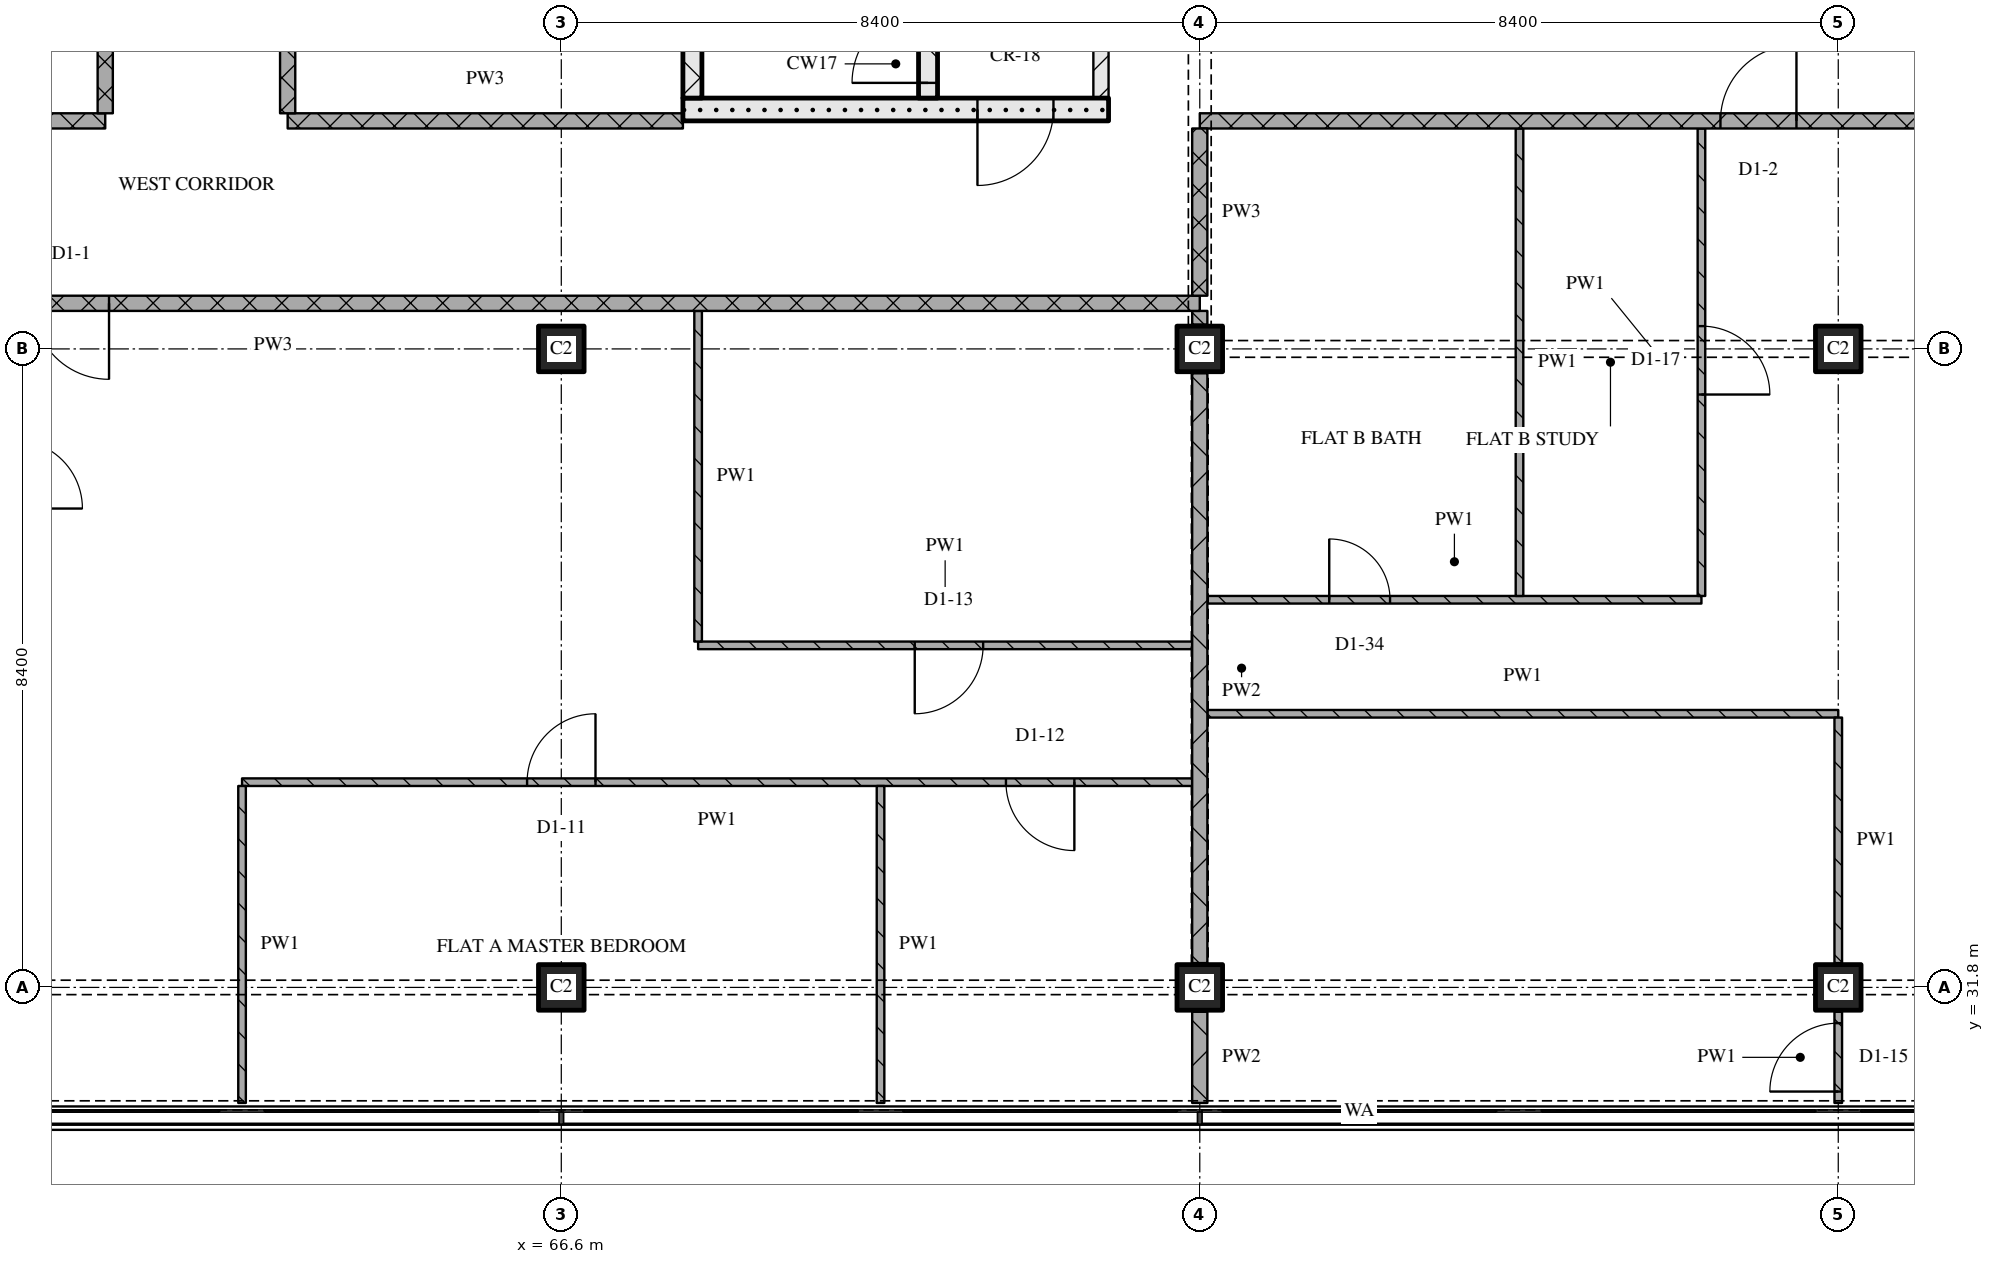
"""IFC4 building model, lengths in metres.
Left out: names, types, materials, properties, quantities, classifications, styles, units other than length and angle.
Written with IfcOpenShell. Run it as: python <this file> out.ifc"""

import sys

from ifc_helpers import new_model, si_unit, direction, frame, frame_2d, origin, origin_2d, place, context, subcontext, project, spatial, rectangle, extrude, element, fill, save


model = new_model("IFC4")
c1 = context("Model", 3, precision=1e-05, world=origin(), true_north=direction((0.0, 1.0)))
c2 = subcontext(c1, "Body", "Model", "MODEL_VIEW")
j1 = project(units=[si_unit("LENGTHUNIT", "METRE"), si_unit("PLANEANGLEUNIT", "RADIAN")], contexts=[c1])
p1 = place(None, origin())
s1 = spatial("IfcSite", under=j1, at=p1, CompositionType="ELEMENT")
p2 = place(p1, origin())
s2 = spatial("IfcBuilding", under=s1, at=p2, CompositionType="ELEMENT")
p3 = place(p2, frame((0.0, 0.0, 209.1)))
s3 = spatial("IfcBuildingStorey", under=s2, at=p3, CompositionType="ELEMENT", Elevation=209.1)
for number, where, z_axis, x_axis in (
    (1, (66.6, 31.8, 0.0), (0.0, 0.0, 1.0), (1.0, 0.0, 0.0)),
    (2, (66.6, 40.2, 0.0), (0.0, 0.0, 1.0), (1.0, 0.0, 0.0)),
    (3, (75.0, 31.8, 0.0), (0.0, 0.0, 1.0), (1.0, 0.0, 0.0)),
    (4, (75.0, 40.2, 0.0), (0.0, 0.0, 1.0), (1.0, 0.0, 0.0)),
    (5, (83.4, 31.8, 0.0), (0.0, 0.0, 1.0), (1.0, 0.0, 0.0)),
    (6, (83.4, 40.2, 0.0), (0.0, 0.0, 1.0), (1.0, 0.0, 0.0)),
):
    element("IfcColumn", number, at=place(p3, frame(where, z_axis=z_axis, x_axis=x_axis)), inside=s3, PredefinedType="COLUMN", context=c2, shape_type="SweptSolid", body=[
        extrude(rectangle(XDim=0.6, YDim=0.6, at=origin_2d()), origin(), (0.0, 0.0, 1.0), 3.6),
    ])
p4 = place(p3, frame((68.2, 43.35, 0.0), z_axis=(0.0, 0.0, 1.0), x_axis=(1.0, 0.0, 0.0)))
e7 = element("IfcWall", 7, at=p4, inside=s3, PredefinedType="SOLIDWALL", context=c2, shape_type="SweptSolid", body=[
    extrude(rectangle(XDim=5.6, YDim=0.3, at=frame_2d((2.8, 0.0))), origin(), (0.0, 0.0, 1.0), 3.32),
])
p5 = place(p4, frame((3.875, 0.0, 0.0)))
e8 = element("IfcOpeningElement", 8, at=p5, cuts=e7, PredefinedType="OPENING", context=c2, shape_type="SweptSolid", body=[
    extrude(rectangle(XDim=1.0, YDim=2.1, at=frame_2d((0.5, 1.05))), frame((0.0, 0.16, 0.0), z_axis=(0.0, -1.0, 0.0), x_axis=(1.0, 0.0, 0.0)), (0.0, 0.0, 1.0), 0.32),
])
p6 = place(p3, frame((68.325, 43.5, 0.0), z_axis=(0.0, 0.0, 1.0), x_axis=(0.0, 1.0, 0.0)))
e9 = element("IfcWall", 9, at=p6, inside=s3, PredefinedType="SOLIDWALL", context=c2, shape_type="SweptSolid", body=[
    extrude(rectangle(XDim=6.9, YDim=0.25, at=frame_2d((3.45, 0.0))), origin(), (0.0, 0.0, 1.0), 3.32),
])
p7 = place(p3, frame((71.425, 43.5, 0.0), z_axis=(0.0, 0.0, 1.0), x_axis=(0.0, 1.0, 0.0)))
e10 = element("IfcWall", 10, at=p7, inside=s3, PredefinedType="SOLIDWALL", context=c2, shape_type="SweptSolid", body=[
    extrude(rectangle(XDim=6.9, YDim=0.25, at=frame_2d((3.45, 0.0))), origin(), (0.0, 0.0, 1.0), 3.32),
])
p8 = place(p7, frame((0.2, 0.0, 0.0)))
e11 = element("IfcOpeningElement", 11, at=p8, cuts=e10, PredefinedType="OPENING", context=c2, shape_type="SweptSolid", body=[
    extrude(rectangle(XDim=1.0, YDim=2.1, at=frame_2d((0.5, 1.05))), frame((0.0, 0.135, 0.0), z_axis=(0.0, -1.0, 0.0), x_axis=(1.0, 0.0, 0.0)), (0.0, 0.0, 1.0), 0.27),
])
p9 = place(p3, frame((73.7, 43.5, 0.0), z_axis=(0.0, 0.0, 1.0), x_axis=(0.0, 1.0, 0.0)))
e12 = element("IfcWall", 12, at=p9, inside=s3, PredefinedType="PARTITIONING", context=c2, shape_type="SweptSolid", body=[
    extrude(rectangle(XDim=6.9, YDim=0.2, at=frame_2d((3.45, 0.0))), origin(), (0.0, 0.0, 1.0), 3.32),
])
p10 = place(p9, frame((1.0, 0.0, 0.0)))
e13 = element("IfcOpeningElement", 13, at=p10, cuts=e12, PredefinedType="OPENING", context=c2, shape_type="SweptSolid", body=[
    extrude(rectangle(XDim=1.0, YDim=2.1, at=frame_2d((0.5, 1.05))), frame((0.0, 0.11, 0.0), z_axis=(0.0, -1.0, 0.0), x_axis=(1.0, 0.0, 0.0)), (0.0, 0.0, 1.0), 0.22),
])
p11 = place(p3, frame((74.9, 34.5, 0.0), z_axis=(0.0, 0.0, 1.0), x_axis=(-1.0, 0.0, 0.0)))
e14 = element("IfcWall", 14, at=p11, inside=s3, PredefinedType="PARTITIONING", context=c2, shape_type="SweptSolid", body=[
    extrude(rectangle(XDim=12.5, YDim=0.1, at=frame_2d((6.25, 0.0))), origin(), (0.0, 0.0, 1.0), 3.32),
])
p12 = place(p11, frame((1.55, 0.0, 0.0)))
e15 = element("IfcOpeningElement", 15, at=p12, cuts=e14, PredefinedType="OPENING", context=c2, shape_type="SweptSolid", body=[
    extrude(rectangle(XDim=0.9, YDim=2.1, at=frame_2d((0.45, 1.05))), frame((0.0, 0.06, 0.0), z_axis=(0.0, -1.0, 0.0), x_axis=(1.0, 0.0, 0.0)), (0.0, 0.0, 1.0), 0.12),
])
p13 = place(p11, frame((7.85, 0.0, 0.0)))
e16 = element("IfcOpeningElement", 16, at=p13, cuts=e14, PredefinedType="OPENING", context=c2, shape_type="SweptSolid", body=[
    extrude(rectangle(XDim=0.9, YDim=2.1, at=frame_2d((0.45, 1.05))), frame((0.0, 0.06, 0.0), z_axis=(0.0, -1.0, 0.0), x_axis=(1.0, 0.0, 0.0)), (0.0, 0.0, 1.0), 0.12),
])
p14 = place(p3, frame((75.1, 35.4, 0.0), z_axis=(0.0, 0.0, 1.0), x_axis=(1.0, 0.0, 0.0)))
e17 = element("IfcWall", 17, at=p14, inside=s3, PredefinedType="PARTITIONING", context=c2, shape_type="SweptSolid", body=[
    extrude(rectangle(XDim=8.3, YDim=0.1, at=frame_2d((4.15, 0.0))), origin(), (0.0, 0.0, 1.0), 3.32),
])
p15 = place(p3, frame((68.4, 36.3, 0.0), z_axis=(0.0, 0.0, 1.0), x_axis=(1.0, 0.0, 0.0)))
e18 = element("IfcWall", 18, at=p15, inside=s3, PredefinedType="PARTITIONING", context=c2, shape_type="SweptSolid", body=[
    extrude(rectangle(XDim=6.5, YDim=0.1, at=frame_2d((3.25, 0.0))), origin(), (0.0, 0.0, 1.0), 3.32),
])
p16 = place(p15, frame((2.85, 0.0, 0.0)))
e19 = element("IfcOpeningElement", 19, at=p16, cuts=e18, PredefinedType="OPENING", context=c2, shape_type="SweptSolid", body=[
    extrude(rectangle(XDim=0.9, YDim=2.1, at=frame_2d((0.45, 1.05))), frame((0.0, 0.06, 0.0), z_axis=(0.0, -1.0, 0.0), x_axis=(1.0, 0.0, 0.0)), (0.0, 0.0, 1.0), 0.12),
])
p17 = place(p3, frame((75.1, 36.9, 0.0), z_axis=(0.0, 0.0, 1.0), x_axis=(1.0, 0.0, 0.0)))
e20 = element("IfcWall", 20, at=p17, inside=s3, PredefinedType="PARTITIONING", context=c2, shape_type="SweptSolid", body=[
    extrude(rectangle(XDim=6.5, YDim=0.1, at=frame_2d((3.25, 0.0))), origin(), (0.0, 0.0, 1.0), 3.32),
])
p18 = place(p17, frame((1.603, 0.0, 0.0)))
e21 = element("IfcOpeningElement", 21, at=p18, cuts=e20, PredefinedType="OPENING", context=c2, shape_type="SweptSolid", body=[
    extrude(rectangle(XDim=0.8, YDim=2.1, at=frame_2d((0.4, 1.05))), frame((0.0, 0.06, 0.0), z_axis=(0.0, -1.0, 0.0), x_axis=(1.0, 0.0, 0.0)), (0.0, 0.0, 1.0), 0.12),
])
p19 = place(p3, frame((75.0, 40.8, 0.0), z_axis=(0.0, 0.0, 1.0), x_axis=(-1.0, 0.0, 0.0)))
e22 = element("IfcWall", 22, at=p19, inside=s3, PredefinedType="PARTITIONING", context=c2, shape_type="SweptSolid", body=[
    extrude(rectangle(XDim=24.38, YDim=0.2, at=frame_2d((12.19, 0.0))), origin(), (0.0, 0.0, 1.0), 3.32),
])
p20 = place(p19, frame((14.35, 0.0, 0.0)))
e23 = element("IfcOpeningElement", 23, at=p20, cuts=e22, PredefinedType="OPENING", context=c2, shape_type="SweptSolid", body=[
    extrude(rectangle(XDim=1.0, YDim=2.1, at=frame_2d((0.5, 1.05))), frame((0.0, 0.11, 0.0), z_axis=(0.0, -1.0, 0.0), x_axis=(1.0, 0.0, 0.0)), (0.0, 0.0, 1.0), 0.22),
])
p21 = place(p3, frame((48.28, 43.2, 0.0), z_axis=(0.0, 0.0, 1.0), x_axis=(1.0, 0.0, 0.0)))
e24 = element("IfcWall", 24, at=p21, inside=s3, PredefinedType="PARTITIONING", context=c2, shape_type="SweptSolid", body=[
    extrude(rectangle(XDim=12.32, YDim=0.2, at=frame_2d((6.16, 0.0))), origin(), (0.0, 0.0, 1.0), 3.32),
])
p22 = place(p21, frame((5.42, 0.0, 0.0)))
e25 = element("IfcOpeningElement", 25, at=p22, cuts=e24, PredefinedType="OPENING", context=c2, shape_type="SweptSolid", body=[
    extrude(rectangle(XDim=1.2, YDim=2.1, at=frame_2d((0.6, 1.05))), frame((0.0, 0.11, 0.0), z_axis=(0.0, -1.0, 0.0), x_axis=(1.0, 0.0, 0.0)), (0.0, 0.0, 1.0), 0.22),
])
p23 = place(p3, frame((63.0, 43.2, 0.0), z_axis=(0.0, 0.0, 1.0), x_axis=(1.0, 0.0, 0.0)))
e26 = element("IfcWall", 26, at=p23, inside=s3, PredefinedType="PARTITIONING", context=c2, shape_type="SweptSolid", body=[
    extrude(rectangle(XDim=5.2, YDim=0.2, at=frame_2d((2.6, 0.0))), origin(), (0.0, 0.0, 1.0), 3.32),
])
p24 = place(p3, frame((100.2, 43.2, 0.0), z_axis=(0.0, 0.0, 1.0), x_axis=(-1.0, 0.0, 0.0)))
e27 = element("IfcWall", 27, at=p24, inside=s3, PredefinedType="PARTITIONING", context=c2, shape_type="SweptSolid", body=[
    extrude(rectangle(XDim=25.2, YDim=0.2, at=frame_2d((12.6, 0.0))), origin(), (0.0, 0.0, 1.0), 3.32),
])
p25 = place(p24, frame((4.15, 0.0, 0.0)))
e28 = element("IfcOpeningElement", 28, at=p25, cuts=e27, PredefinedType="OPENING", context=c2, shape_type="SweptSolid", body=[
    extrude(rectangle(XDim=1.0, YDim=2.1, at=frame_2d((0.5, 1.05))), frame((0.0, 0.11, 0.0), z_axis=(0.0, -1.0, 0.0), x_axis=(1.0, 0.0, 0.0)), (0.0, 0.0, 1.0), 0.22),
])
p26 = place(p24, frame((17.35, 0.0, 0.0)))
e29 = element("IfcOpeningElement", 29, at=p26, cuts=e27, PredefinedType="OPENING", context=c2, shape_type="SweptSolid", body=[
    extrude(rectangle(XDim=1.0, YDim=2.1, at=frame_2d((0.5, 1.05))), frame((0.0, 0.11, 0.0), z_axis=(0.0, -1.0, 0.0), x_axis=(1.0, 0.0, 0.0)), (0.0, 0.0, 1.0), 0.22),
])
p27 = place(p3, frame((60.6, 61.1, 0.0), z_axis=(0.0, 0.0, 1.0), x_axis=(0.0, -1.0, 0.0)))
e30 = element("IfcWall", 30, at=p27, inside=s3, PredefinedType="PARTITIONING", context=c2, shape_type="SweptSolid", body=[
    extrude(rectangle(XDim=17.8, YDim=0.2, at=frame_2d((8.9, 0.0))), origin(), (0.0, 0.0, 1.0), 3.32),
])
p28 = place(p3, frame((62.4, 34.45, 0.0), z_axis=(0.0, 0.0, 1.0), x_axis=(0.0, -1.0, 0.0)))
e31 = element("IfcWall", 31, at=p28, inside=s3, PredefinedType="PARTITIONING", context=c2, shape_type="SweptSolid", body=[
    extrude(rectangle(XDim=4.17, YDim=0.1, at=frame_2d((2.085, 0.0))), origin(), (0.0, 0.0, 1.0), 3.32),
])
p29 = place(p3, frame((63.0, 58.7, 0.0), z_axis=(0.0, 0.0, 1.0), x_axis=(0.0, -1.0, 0.0)))
e32 = element("IfcWall", 32, at=p29, inside=s3, PredefinedType="PARTITIONING", context=c2, shape_type="SweptSolid", body=[
    extrude(rectangle(XDim=15.4, YDim=0.2, at=frame_2d((7.7, 0.0))), origin(), (0.0, 0.0, 1.0), 3.32),
])
p30 = place(p29, frame((3.15, 0.0, 0.0)))
e33 = element("IfcOpeningElement", 33, at=p30, cuts=e32, PredefinedType="OPENING", context=c2, shape_type="SweptSolid", body=[
    extrude(rectangle(XDim=1.0, YDim=2.1, at=frame_2d((0.5, 1.05))), frame((0.0, 0.11, 0.0), z_axis=(0.0, -1.0, 0.0), x_axis=(1.0, 0.0, 0.0)), (0.0, 0.0, 1.0), 0.22),
])
p31 = place(p29, frame((11.25, 0.0, 0.0)))
e34 = element("IfcOpeningElement", 34, at=p31, cuts=e32, PredefinedType="OPENING", context=c2, shape_type="SweptSolid", body=[
    extrude(rectangle(XDim=0.9, YDim=2.1, at=frame_2d((0.45, 1.05))), frame((0.0, 0.11, 0.0), z_axis=(0.0, -1.0, 0.0), x_axis=(1.0, 0.0, 0.0)), (0.0, 0.0, 1.0), 0.22),
])
p32 = place(p3, frame((68.4, 40.7, 0.0), z_axis=(0.0, 0.0, 1.0), x_axis=(0.0, -1.0, 0.0)))
e35 = element("IfcWall", 35, at=p32, inside=s3, PredefinedType="PARTITIONING", context=c2, shape_type="SweptSolid", body=[
    extrude(rectangle(XDim=4.35, YDim=0.1, at=frame_2d((2.175, 0.0))), origin(), (0.0, 0.0, 1.0), 3.32),
])
p33 = place(p3, frame((70.8, 34.45, 0.0), z_axis=(0.0, 0.0, 1.0), x_axis=(0.0, -1.0, 0.0)))
e36 = element("IfcWall", 36, at=p33, inside=s3, PredefinedType="PARTITIONING", context=c2, shape_type="SweptSolid", body=[
    extrude(rectangle(XDim=4.17, YDim=0.1, at=frame_2d((2.085, 0.0))), origin(), (0.0, 0.0, 1.0), 3.32),
])
p34 = place(p3, frame((75.0, 43.1, 0.0), z_axis=(0.0, 0.0, 1.0), x_axis=(0.0, -1.0, 0.0)))
e37 = element("IfcWall", 37, at=p34, inside=s3, PredefinedType="PARTITIONING", context=c2, shape_type="SweptSolid", body=[
    extrude(rectangle(XDim=2.2, YDim=0.2, at=frame_2d((1.1, 0.0))), origin(), (0.0, 0.0, 1.0), 2.53),
])
p35 = place(p3, frame((75.0, 31.48, 0.0), z_axis=(0.0, 0.0, 1.0), x_axis=(0.0, -1.0, 0.0)))
e38 = element("IfcWall", 38, at=p35, inside=s3, PredefinedType="PARTITIONING", context=c2, shape_type="SweptSolid", body=[
    extrude(rectangle(XDim=1.2, YDim=0.2, at=frame_2d((0.6, 0.0))), origin(), (0.0, 0.0, 1.0), 3.32),
])
p36 = place(p3, frame((75.0, 39.88, 0.0), z_axis=(0.0, 0.0, 1.0), x_axis=(0.0, -1.0, 0.0)))
e39 = element("IfcWall", 39, at=p36, inside=s3, PredefinedType="PARTITIONING", context=c2, shape_type="SweptSolid", body=[
    extrude(rectangle(XDim=7.76, YDim=0.2, at=frame_2d((3.88, 0.0))), origin(), (0.0, 0.0, 1.0), 2.72),
])
p37 = place(p3, frame((75.0, 40.7, 0.0), z_axis=(0.0, 0.0, 1.0), x_axis=(0.0, -1.0, 0.0)))
e40 = element("IfcWall", 40, at=p37, inside=s3, PredefinedType="PARTITIONING", context=c2, shape_type="SweptSolid", body=[
    extrude(rectangle(XDim=0.18, YDim=0.2, at=frame_2d((0.09, 0.0))), origin(), (0.0, 0.0, 1.0), 3.32),
])
p38 = place(p3, frame((79.206, 43.1, 0.0), z_axis=(0.0, 0.0, 1.0), x_axis=(0.0, -1.0, 0.0)))
e41 = element("IfcWall", 41, at=p38, inside=s3, PredefinedType="PARTITIONING", context=c2, shape_type="SweptSolid", body=[
    extrude(rectangle(XDim=6.15, YDim=0.1, at=frame_2d((3.075, 0.0))), origin(), (0.0, 0.0, 1.0), 3.32),
])
p39 = place(p3, frame((81.6, 36.95, 0.0), z_axis=(0.0, 0.0, 1.0), x_axis=(0.0, 1.0, 0.0)))
e42 = element("IfcWall", 42, at=p39, inside=s3, PredefinedType="PARTITIONING", context=c2, shape_type="SweptSolid", body=[
    extrude(rectangle(XDim=6.15, YDim=0.1, at=frame_2d((3.075, 0.0))), origin(), (0.0, 0.0, 1.0), 3.32),
])
p40 = place(p39, frame((2.65, 0.0, 0.0)))
e43 = element("IfcOpeningElement", 43, at=p40, cuts=e42, PredefinedType="OPENING", context=c2, shape_type="SweptSolid", body=[
    extrude(rectangle(XDim=0.9, YDim=2.1, at=frame_2d((0.45, 1.05))), frame((0.0, 0.06, 0.0), z_axis=(0.0, -1.0, 0.0), x_axis=(1.0, 0.0, 0.0)), (0.0, 0.0, 1.0), 0.12),
])
p41 = place(p3, frame((83.4, 30.28, 0.0), z_axis=(0.0, 0.0, 1.0), x_axis=(0.0, 1.0, 0.0)))
e44 = element("IfcWall", 44, at=p41, inside=s3, PredefinedType="PARTITIONING", context=c2, shape_type="SweptSolid", body=[
    extrude(rectangle(XDim=1.2, YDim=0.1, at=frame_2d((0.6, 0.0))), origin(), (0.0, 0.0, 1.0), 3.32),
])
p42 = place(p41, frame((0.15, 0.0, 0.0)))
e45 = element("IfcOpeningElement", 45, at=p42, cuts=e44, PredefinedType="OPENING", context=c2, shape_type="SweptSolid", body=[
    extrude(rectangle(XDim=0.9, YDim=2.1, at=frame_2d((0.45, 1.05))), frame((0.0, 0.06, 0.0), z_axis=(0.0, -1.0, 0.0), x_axis=(1.0, 0.0, 0.0)), (0.0, 0.0, 1.0), 0.12),
])
p43 = place(p3, frame((83.4, 35.35, 0.0), z_axis=(0.0, 0.0, 1.0), x_axis=(0.0, -1.0, 0.0)))
e46 = element("IfcWall", 46, at=p43, inside=s3, PredefinedType="PARTITIONING", context=c2, shape_type="SweptSolid", body=[
    extrude(rectangle(XDim=3.23, YDim=0.1, at=frame_2d((1.615, 0.0))), origin(), (0.0, 0.0, 1.0), 3.32),
])
p44 = place(p5, origin())
e47 = element("IfcDoor", 47, at=p44, inside=s3, OperationType="SINGLE_SWING_RIGHT", PredefinedType="DOOR", context=c2, shape_type="SweptSolid", body=[
    extrude(rectangle(XDim=1.0, YDim=2.1, at=frame_2d((0.5, 1.05))), frame((0.0, 0.025, 0.0), z_axis=(0.0, -1.0, 0.0), x_axis=(1.0, 0.0, 0.0)), (0.0, 0.0, 1.0), 0.05),
])
fill(e8, e47)
p45 = place(p8, origin())
e48 = element("IfcDoor", 48, at=p45, inside=s3, OperationType="SINGLE_SWING_LEFT", PredefinedType="DOOR", context=c2, shape_type="SweptSolid", body=[
    extrude(rectangle(XDim=1.0, YDim=2.1, at=frame_2d((0.5, 1.05))), frame((0.0, 0.025, 0.0), z_axis=(0.0, -1.0, 0.0), x_axis=(1.0, 0.0, 0.0)), (0.0, 0.0, 1.0), 0.05),
])
fill(e11, e48)
p46 = place(p12, origin())
e49 = element("IfcDoor", 49, at=p46, inside=s3, OperationType="SINGLE_SWING_LEFT", PredefinedType="DOOR", context=c2, shape_type="SweptSolid", body=[
    extrude(rectangle(XDim=0.9, YDim=2.1, at=frame_2d((0.45, 1.05))), frame((0.0, 0.025, 0.0), z_axis=(0.0, -1.0, 0.0), x_axis=(1.0, 0.0, 0.0)), (0.0, 0.0, 1.0), 0.05),
])
fill(e15, e49)
p47 = place(p13, origin())
e50 = element("IfcDoor", 50, at=p47, inside=s3, OperationType="SINGLE_SWING_RIGHT", PredefinedType="DOOR", context=c2, shape_type="SweptSolid", body=[
    extrude(rectangle(XDim=0.9, YDim=2.1, at=frame_2d((0.45, 1.05))), frame((0.0, 0.025, 0.0), z_axis=(0.0, -1.0, 0.0), x_axis=(1.0, 0.0, 0.0)), (0.0, 0.0, 1.0), 0.05),
])
fill(e16, e50)
p48 = place(p16, origin())
e51 = element("IfcDoor", 51, at=p48, inside=s3, OperationType="SINGLE_SWING_RIGHT", PredefinedType="DOOR", context=c2, shape_type="SweptSolid", body=[
    extrude(rectangle(XDim=0.9, YDim=2.1, at=frame_2d((0.45, 1.05))), frame((0.0, 0.025, 0.0), z_axis=(0.0, -1.0, 0.0), x_axis=(1.0, 0.0, 0.0)), (0.0, 0.0, 1.0), 0.05),
])
fill(e19, e51)
p49 = place(p18, origin())
e52 = element("IfcDoor", 52, at=p49, inside=s3, OperationType="SINGLE_SWING_LEFT", PredefinedType="DOOR", context=c2, shape_type="SweptSolid", body=[
    extrude(rectangle(XDim=0.8, YDim=2.1, at=frame_2d((0.4, 1.05))), frame((0.0, 0.025, 0.0), z_axis=(0.0, -1.0, 0.0), x_axis=(1.0, 0.0, 0.0)), (0.0, 0.0, 1.0), 0.05),
])
fill(e21, e52)
p50 = place(p20, origin())
e53 = element("IfcDoor", 53, at=p50, inside=s3, OperationType="SINGLE_SWING_LEFT", PredefinedType="DOOR", context=c2, shape_type="SweptSolid", body=[
    extrude(rectangle(XDim=1.0, YDim=2.1, at=frame_2d((0.5, 1.05))), frame((0.0, 0.025, 0.0), z_axis=(0.0, -1.0, 0.0), x_axis=(1.0, 0.0, 0.0)), (0.0, 0.0, 1.0), 0.05),
])
fill(e23, e53)
p51 = place(p26, origin())
e54 = element("IfcDoor", 54, at=p51, inside=s3, OperationType="SINGLE_SWING_RIGHT", PredefinedType="DOOR", context=c2, shape_type="SweptSolid", body=[
    extrude(rectangle(XDim=1.0, YDim=2.1, at=frame_2d((0.5, 1.05))), frame((0.0, 0.025, 0.0), z_axis=(0.0, -1.0, 0.0), x_axis=(1.0, 0.0, 0.0)), (0.0, 0.0, 1.0), 0.05),
])
fill(e29, e54)
p52 = place(p40, origin())
e55 = element("IfcDoor", 55, at=p52, inside=s3, OperationType="SINGLE_SWING_RIGHT", PredefinedType="DOOR", context=c2, shape_type="SweptSolid", body=[
    extrude(rectangle(XDim=0.9, YDim=2.1, at=frame_2d((0.45, 1.05))), frame((0.0, 0.025, 0.0), z_axis=(0.0, -1.0, 0.0), x_axis=(1.0, 0.0, 0.0)), (0.0, 0.0, 1.0), 0.05),
])
fill(e43, e55)
p53 = place(p42, origin())
e56 = element("IfcDoor", 56, at=p53, inside=s3, OperationType="SINGLE_SWING_LEFT", PredefinedType="DOOR", context=c2, shape_type="SweptSolid", body=[
    extrude(rectangle(XDim=0.9, YDim=2.1, at=frame_2d((0.45, 1.05))), frame((0.0, 0.025, 0.0), z_axis=(0.0, -1.0, 0.0), x_axis=(1.0, 0.0, 0.0)), (0.0, 0.0, 1.0), 0.05),
])
fill(e45, e56)
save(model, sys.argv[1])
